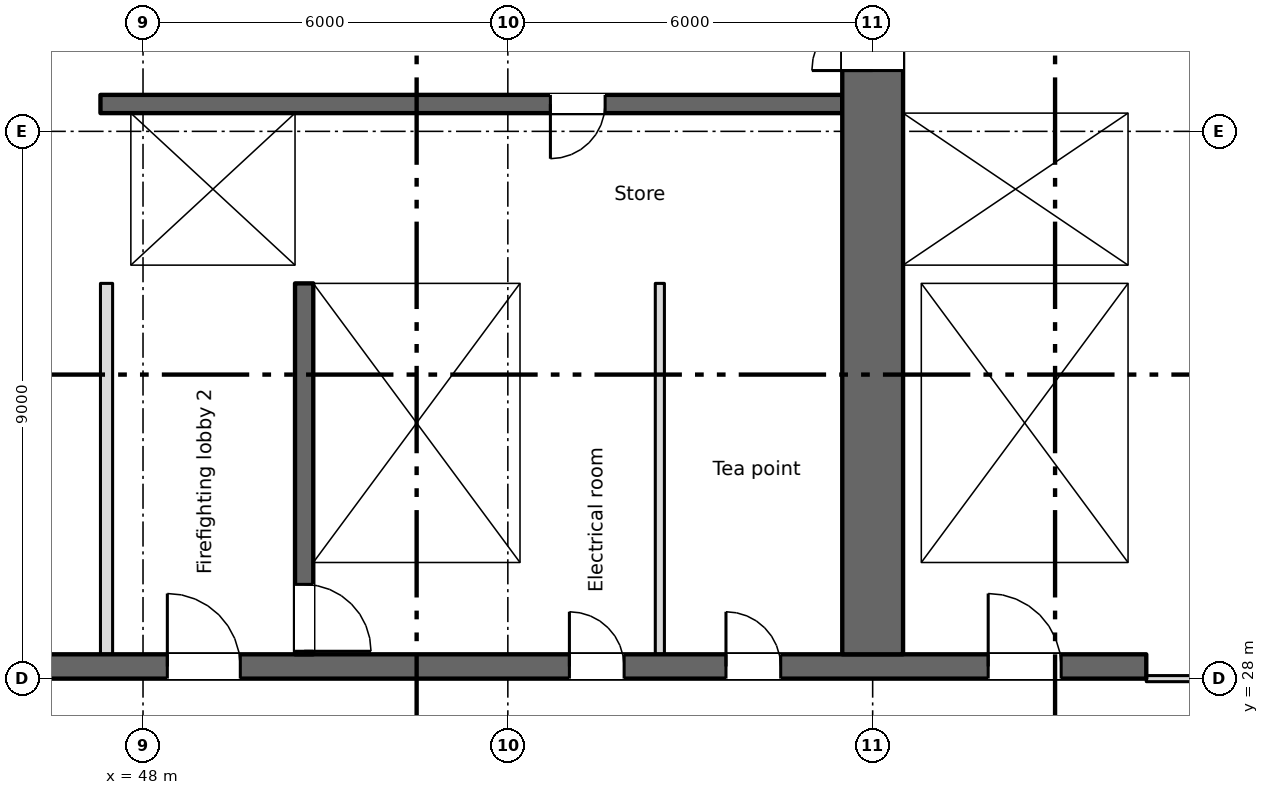
"""IFC4 building model, lengths in metres.
Left out: names, types, materials, properties, quantities, classifications, styles, units other than length and angle.
Written with IfcOpenShell. Run it as: python <this file> out.ifc"""

import sys

from ifc_helpers import new_model, si_unit, direction, frame, frame_2d, origin, place, context, subcontext, project, spatial, rectangle, extrude, element, fill, save


model = new_model("IFC4")
c1 = context("Model", 3, precision=1e-05, world=origin(), true_north=direction((0.0, 1.0)))
c2 = subcontext(c1, "Body", "Model", "MODEL_VIEW")
j1 = project(units=[si_unit("LENGTHUNIT", "METRE"), si_unit("PLANEANGLEUNIT", "RADIAN")], contexts=[c1])
p1 = place(None, origin())
s1 = spatial("IfcSite", under=j1, at=p1, CompositionType="ELEMENT")
p2 = place(p1, origin())
s2 = spatial("IfcBuilding", under=s1, at=p2, CompositionType="ELEMENT")
p3 = place(p2, frame((0.0, 0.0, 41.25)))
s3 = spatial("IfcBuildingStorey", under=s2, at=p3, CompositionType="ELEMENT", Elevation=41.25)
p4 = place(p3, frame((6.7, 28.2, 0.0), z_axis=(0.0, 0.0, 1.0), x_axis=(1.0, 0.0, 0.0)))
e1 = element("IfcWall", 1, at=p4, inside=s3, PredefinedType="SHEAR", context=c2, shape_type="SweptSolid", body=[
    extrude(rectangle(XDim=57.8, YDim=0.4, at=frame_2d((28.9, 0.0))), origin(), (0.0, 0.0, 1.0), 3.35),
])
p5 = place(p4, frame((12.812, 0.0, 0.0)))
e2 = element("IfcOpeningElement", 2, at=p5, cuts=e1, PredefinedType="OPENING", context=c2, shape_type="SweptSolid", body=[
    extrude(rectangle(XDim=0.9, YDim=2.1, at=frame_2d((0.45, 1.05))), frame((0.0, 0.21, 0.0), z_axis=(0.0, -1.0, 0.0), x_axis=(1.0, 0.0, 0.0)), (0.0, 0.0, 1.0), 0.42),
])
p6 = place(p4, frame((15.387, 0.0, 0.0)))
e3 = element("IfcOpeningElement", 3, at=p6, cuts=e1, PredefinedType="OPENING", context=c2, shape_type="SweptSolid", body=[
    extrude(rectangle(XDim=0.9, YDim=2.1, at=frame_2d((0.45, 1.05))), frame((0.0, 0.21, 0.0), z_axis=(0.0, -1.0, 0.0), x_axis=(1.0, 0.0, 0.0)), (0.0, 0.0, 1.0), 0.42),
])
p7 = place(p4, frame((48.312, 0.0, 0.0)))
e4 = element("IfcOpeningElement", 4, at=p7, cuts=e1, PredefinedType="OPENING", context=c2, shape_type="SweptSolid", body=[
    extrude(rectangle(XDim=0.9, YDim=2.1, at=frame_2d((0.45, 1.05))), frame((0.0, 0.21, 0.0), z_axis=(0.0, -1.0, 0.0), x_axis=(1.0, 0.0, 0.0)), (0.0, 0.0, 1.0), 0.42),
])
p8 = place(p4, frame((50.887, 0.0, 0.0)))
e5 = element("IfcOpeningElement", 5, at=p8, cuts=e1, PredefinedType="OPENING", context=c2, shape_type="SweptSolid", body=[
    extrude(rectangle(XDim=0.9, YDim=2.1, at=frame_2d((0.45, 1.05))), frame((0.0, 0.21, 0.0), z_axis=(0.0, -1.0, 0.0), x_axis=(1.0, 0.0, 0.0)), (0.0, 0.0, 1.0), 0.42),
])
p9 = place(p4, frame((0.562, 0.0, 0.0)))
e6 = element("IfcOpeningElement", 6, at=p9, cuts=e1, PredefinedType="OPENING", context=c2, shape_type="SweptSolid", body=[
    extrude(rectangle(XDim=0.9, YDim=2.1, at=frame_2d((0.45, 1.05))), frame((0.0, 0.21, 0.0), z_axis=(0.0, -1.0, 0.0), x_axis=(1.0, 0.0, 0.0)), (0.0, 0.0, 1.0), 0.42),
])
p10 = place(p4, frame((2.137, 0.0, 0.0)))
e7 = element("IfcOpeningElement", 7, at=p10, cuts=e1, PredefinedType="OPENING", context=c2, shape_type="SweptSolid", body=[
    extrude(rectangle(XDim=0.9, YDim=2.1, at=frame_2d((0.45, 1.05))), frame((0.0, 0.21, 0.0), z_axis=(0.0, -1.0, 0.0), x_axis=(1.0, 0.0, 0.0)), (0.0, 0.0, 1.0), 0.42),
])
p11 = place(p4, frame((4.7, 0.0, 0.0)))
e8 = element("IfcOpeningElement", 8, at=p11, cuts=e1, PredefinedType="OPENING", context=c2, shape_type="SweptSolid", body=[
    extrude(rectangle(XDim=1.2, YDim=2.1, at=frame_2d((0.6, 1.05))), frame((0.0, 0.21, 0.0), z_axis=(0.0, -1.0, 0.0), x_axis=(1.0, 0.0, 0.0)), (0.0, 0.0, 1.0), 0.42),
])
p12 = place(p4, frame((31.7, 0.0, 0.0)))
e9 = element("IfcOpeningElement", 9, at=p12, cuts=e1, PredefinedType="OPENING", context=c2, shape_type="SweptSolid", body=[
    extrude(rectangle(XDim=1.2, YDim=2.1, at=frame_2d((0.6, 1.05))), frame((0.0, 0.21, 0.0), z_axis=(0.0, -1.0, 0.0), x_axis=(1.0, 0.0, 0.0)), (0.0, 0.0, 1.0), 0.42),
])
p13 = place(p4, frame((55.2, 0.0, 0.0)))
e10 = element("IfcOpeningElement", 10, at=p13, cuts=e1, PredefinedType="OPENING", context=c2, shape_type="SweptSolid", body=[
    extrude(rectangle(XDim=1.2, YDim=2.1, at=frame_2d((0.6, 1.05))), frame((0.0, 0.21, 0.0), z_axis=(0.0, -1.0, 0.0), x_axis=(1.0, 0.0, 0.0)), (0.0, 0.0, 1.0), 0.42),
])
p14 = place(p4, frame((21.7, 0.0, 0.0)))
e11 = element("IfcOpeningElement", 11, at=p14, cuts=e1, PredefinedType="OPENING", context=c2, shape_type="SweptSolid", body=[
    extrude(rectangle(XDim=1.2, YDim=2.1, at=frame_2d((0.6, 1.05))), frame((0.0, 0.21, 0.0), z_axis=(0.0, -1.0, 0.0), x_axis=(1.0, 0.0, 0.0)), (0.0, 0.0, 1.0), 0.42),
])
p15 = place(p4, frame((41.7, 0.0, 0.0)))
e12 = element("IfcOpeningElement", 12, at=p15, cuts=e1, PredefinedType="OPENING", context=c2, shape_type="SweptSolid", body=[
    extrude(rectangle(XDim=1.2, YDim=2.1, at=frame_2d((0.6, 1.05))), frame((0.0, 0.21, 0.0), z_axis=(0.0, -1.0, 0.0), x_axis=(1.0, 0.0, 0.0)), (0.0, 0.0, 1.0), 0.42),
])
p16 = place(p4, frame((24.85, 0.0, 0.0)))
e13 = element("IfcOpeningElement", 13, at=p16, cuts=e1, PredefinedType="OPENING", context=c2, shape_type="SweptSolid", body=[
    extrude(rectangle(XDim=2.4, YDim=2.1, at=frame_2d((1.2, 1.05))), frame((0.0, 0.21, 0.0), z_axis=(0.0, -1.0, 0.0), x_axis=(1.0, 0.0, 0.0)), (0.0, 0.0, 1.0), 0.42),
])
p17 = place(p4, frame((37.35, 0.0, 0.0)))
e14 = element("IfcOpeningElement", 14, at=p17, cuts=e1, PredefinedType="OPENING", context=c2, shape_type="SweptSolid", body=[
    extrude(rectangle(XDim=2.4, YDim=2.1, at=frame_2d((1.2, 1.05))), frame((0.0, 0.21, 0.0), z_axis=(0.0, -1.0, 0.0), x_axis=(1.0, 0.0, 0.0)), (0.0, 0.0, 1.0), 0.42),
])
p18 = place(p4, frame((7.85, 0.0, 0.0)))
e15 = element("IfcOpeningElement", 15, at=p18, cuts=e1, PredefinedType="OPENING", context=c2, shape_type="SweptSolid", body=[
    extrude(rectangle(XDim=2.4, YDim=2.1, at=frame_2d((1.2, 1.05))), frame((0.0, 0.21, 0.0), z_axis=(0.0, -1.0, 0.0), x_axis=(1.0, 0.0, 0.0)), (0.0, 0.0, 1.0), 0.42),
])
p19 = place(p4, frame((28.85, 0.0, 0.0)))
e16 = element("IfcOpeningElement", 16, at=p19, cuts=e1, PredefinedType="OPENING", context=c2, shape_type="SweptSolid", body=[
    extrude(rectangle(XDim=0.9, YDim=2.1, at=frame_2d((0.45, 1.05))), frame((0.0, 0.21, 0.0), z_axis=(0.0, -1.0, 0.0), x_axis=(1.0, 0.0, 0.0)), (0.0, 0.0, 1.0), 0.42),
])
p20 = place(p4, frame((34.85, 0.0, 0.0)))
e17 = element("IfcOpeningElement", 17, at=p20, cuts=e1, PredefinedType="OPENING", context=c2, shape_type="SweptSolid", body=[
    extrude(rectangle(XDim=0.9, YDim=2.1, at=frame_2d((0.45, 1.05))), frame((0.0, 0.21, 0.0), z_axis=(0.0, -1.0, 0.0), x_axis=(1.0, 0.0, 0.0)), (0.0, 0.0, 1.0), 0.42),
])
p21 = place(p3, frame((64.35, 34.8, 0.0), z_axis=(0.0, 0.0, 1.0), x_axis=(0.0, 1.0, 0.0)))
e18 = element("IfcWall", 18, at=p21, inside=s3, PredefinedType="SHEAR", context=c2, shape_type="SweptSolid", body=[
    extrude(rectangle(XDim=10.2, YDim=0.3, at=frame_2d((5.1, 0.0))), origin(), (0.0, 0.0, 1.0), 3.35),
])
p22 = place(p3, frame((60.0, 28.4, 0.0), z_axis=(0.0, 0.0, 1.0), x_axis=(0.0, 1.0, 0.0)))
e19 = element("IfcWall", 19, at=p22, inside=s3, PredefinedType="SHEAR", context=c2, shape_type="SweptSolid", body=[
    extrude(rectangle(XDim=16.6, YDim=1.0, at=frame_2d((8.3, 0.0))), origin(), (0.0, 0.0, 1.0), 3.35),
])
p23 = place(p22, frame((9.6, 0.0, 0.0)))
e20 = element("IfcOpeningElement", 20, at=p23, cuts=e19, PredefinedType="OPENING", context=c2, shape_type="SweptSolid", body=[
    extrude(rectangle(XDim=2.0, YDim=2.1, at=frame_2d((1.0, 1.05))), frame((0.0, 0.51, 0.0), z_axis=(0.0, -1.0, 0.0), x_axis=(1.0, 0.0, 0.0)), (0.0, 0.0, 1.0), 1.02),
])
p24 = place(p22, frame((15.25, 0.0, 0.0)))
e21 = element("IfcOpeningElement", 21, at=p24, cuts=e19, PredefinedType="OPENING", context=c2, shape_type="SweptSolid", body=[
    extrude(rectangle(XDim=1.2, YDim=2.1, at=frame_2d((0.6, 1.05))), frame((0.0, 0.51, 0.0), z_axis=(0.0, -1.0, 0.0), x_axis=(1.0, 0.0, 0.0)), (0.0, 0.0, 1.0), 1.02),
])
p25 = place(p3, frame((50.65, 34.5, 0.0), z_axis=(0.0, 0.0, 1.0), x_axis=(0.0, -1.0, 0.0)))
e22 = element("IfcWall", 22, at=p25, inside=s3, PredefinedType="SHEAR", context=c2, shape_type="SweptSolid", body=[
    extrude(rectangle(XDim=6.1, YDim=0.3, at=frame_2d((3.05, 0.0))), origin(), (0.0, 0.0, 1.0), 3.35),
])
p26 = place(p25, frame((4.95, 0.0, 0.0)))
e23 = element("IfcOpeningElement", 23, at=p26, cuts=e22, PredefinedType="OPENING", context=c2, shape_type="SweptSolid", body=[
    extrude(rectangle(XDim=1.1, YDim=2.1, at=frame_2d((0.55, 1.05))), frame((0.0, 0.16, 0.0), z_axis=(0.0, -1.0, 0.0), x_axis=(1.0, 0.0, 0.0)), (0.0, 0.0, 1.0), 0.32),
])
for number, where, z_axis, x_axis in (
    (24, (54.35, 28.4, 0.0), (0.0, 0.0, 1.0), (0.0, 1.0, 0.0)),
    (25, (60.65, 28.4, 0.0), (0.0, 0.0, 1.0), (0.0, 1.0, 0.0)),
    (26, (64.35, 28.4, 0.0), (0.0, 0.0, 1.0), (0.0, 1.0, 0.0)),
):
    element("IfcWall", number, at=place(p3, frame(where, z_axis=z_axis, x_axis=x_axis)), inside=s3, PredefinedType="SHEAR", context=c2, shape_type="SweptSolid", body=[
        extrude(rectangle(XDim=6.1, YDim=0.3, at=frame_2d((3.05, 0.0))), origin(), (0.0, 0.0, 1.0), 3.35),
    ])
p27 = place(p3, frame((47.3, 34.65, 0.0), z_axis=(0.0, 0.0, 1.0), x_axis=(1.0, 0.0, 0.0)))
e27 = element("IfcWall", 27, at=p27, inside=s3, PredefinedType="SHEAR", context=c2, shape_type="SweptSolid", body=[
    extrude(rectangle(XDim=12.2, YDim=0.3, at=frame_2d((6.1, 0.0))), origin(), (0.0, 0.0, 1.0), 3.35),
])
p28 = place(p27, frame((1.3, 0.0, 0.0)))
e28 = element("IfcOpeningElement", 28, at=p28, cuts=e27, PredefinedType="OPENING", context=c2, shape_type="SweptSolid", body=[
    extrude(rectangle(XDim=1.1, YDim=2.1, at=frame_2d((0.55, 1.05))), frame((0.0, 0.16, 0.0), z_axis=(0.0, -1.0, 0.0), x_axis=(1.0, 0.0, 0.0)), (0.0, 0.0, 1.0), 0.32),
])
p29 = place(p3, frame((60.5, 34.65, 0.0), z_axis=(0.0, 0.0, 1.0), x_axis=(1.0, 0.0, 0.0)))
e29 = element("IfcWall", 29, at=p29, inside=s3, PredefinedType="SHEAR", context=c2, shape_type="SweptSolid", body=[
    extrude(rectangle(XDim=4.0, YDim=0.3, at=frame_2d((2.0, 0.0))), origin(), (0.0, 0.0, 1.0), 3.35),
])
p30 = place(p3, frame((59.5, 37.45, 0.0), z_axis=(0.0, 0.0, 1.0), x_axis=(-1.0, 0.0, 0.0)))
e30 = element("IfcWall", 30, at=p30, inside=s3, PredefinedType="SHEAR", context=c2, shape_type="SweptSolid", body=[
    extrude(rectangle(XDim=12.2, YDim=0.3, at=frame_2d((6.1, 0.0))), origin(), (0.0, 0.0, 1.0), 3.35),
])
p31 = place(p30, frame((3.9, 0.0, 0.0)))
e31 = element("IfcOpeningElement", 31, at=p31, cuts=e30, PredefinedType="OPENING", context=c2, shape_type="SweptSolid", body=[
    extrude(rectangle(XDim=0.9, YDim=2.1, at=frame_2d((0.45, 1.05))), frame((0.0, 0.16, 0.0), z_axis=(0.0, -1.0, 0.0), x_axis=(1.0, 0.0, 0.0)), (0.0, 0.0, 1.0), 0.32),
])
p32 = place(p3, frame((60.5, 37.45, 0.0), z_axis=(0.0, 0.0, 1.0), x_axis=(1.0, 0.0, 0.0)))
e32 = element("IfcWall", 32, at=p32, inside=s3, PredefinedType="SHEAR", context=c2, shape_type="SweptSolid", body=[
    extrude(rectangle(XDim=3.7, YDim=0.3, at=frame_2d((1.85, 0.0))), origin(), (0.0, 0.0, 1.0), 3.35),
])
p33 = place(p32, frame((1.3, 0.0, 0.0)))
e33 = element("IfcOpeningElement", 33, at=p33, cuts=e32, PredefinedType="OPENING", context=c2, shape_type="SweptSolid", body=[
    extrude(rectangle(XDim=1.1, YDim=2.1, at=frame_2d((0.55, 1.05))), frame((0.0, 0.16, 0.0), z_axis=(0.0, -1.0, 0.0), x_axis=(1.0, 0.0, 0.0)), (0.0, 0.0, 1.0), 0.32),
])
p34 = place(p3, frame((47.55, 34.8, 0.0), z_axis=(0.0, 0.0, 1.0), x_axis=(0.0, 1.0, 0.0)))
e34 = element("IfcWall", 34, at=p34, inside=s3, PredefinedType="SHEAR", context=c2, shape_type="SweptSolid", body=[
    extrude(rectangle(XDim=2.5, YDim=0.5, at=frame_2d((1.25, 0.0))), origin(), (0.0, 0.0, 1.0), 3.35),
])
p35 = place(p3, frame((50.65, 34.8, 0.0), z_axis=(0.0, 0.0, 1.0), x_axis=(0.0, 1.0, 0.0)))
e35 = element("IfcWall", 35, at=p35, inside=s3, PredefinedType="SHEAR", context=c2, shape_type="SweptSolid", body=[
    extrude(rectangle(XDim=2.5, YDim=0.3, at=frame_2d((1.25, 0.0))), origin(), (0.0, 0.0, 1.0), 3.35),
])
p36 = place(p3, frame((47.4, 28.4, 0.0), z_axis=(0.0, 0.0, 1.0), x_axis=(0.0, 1.0, 0.0)))
e36 = element("IfcWall", 36, at=p36, inside=s3, PredefinedType="PARTITIONING", context=c2, shape_type="SweptSolid", body=[
    extrude(rectangle(XDim=6.1, YDim=0.2, at=frame_2d((3.05, 0.0))), origin(), (0.0, 0.0, 1.0), 3.35),
])
p37 = place(p3, frame((56.5, 28.4, 0.0), z_axis=(0.0, 0.0, 1.0), x_axis=(0.0, 1.0, 0.0)))
e37 = element("IfcWall", 37, at=p37, inside=s3, PredefinedType="PARTITIONING", context=c2, shape_type="SweptSolid", body=[
    extrude(rectangle(XDim=6.1, YDim=0.15, at=frame_2d((3.05, 0.0))), origin(), (0.0, 0.0, 1.0), 3.35),
])
p38 = place(p3, frame((64.5, 28.0, 0.0), z_axis=(0.0, 0.0, 1.0), x_axis=(1.0, 0.0, 0.0)))
e38 = element("IfcWall", 38, at=p38, inside=s3, PredefinedType="PARTITIONING", context=c2, shape_type="SweptSolid", body=[
    extrude(rectangle(XDim=12.7, YDim=0.1, at=frame_2d((6.35, 0.0))), origin(), (0.0, 0.0, 1.0), 3.35),
])
p39 = place(p38, frame((8.975, 0.0, 0.0)))
e39 = element("IfcOpeningElement", 39, at=p39, cuts=e38, PredefinedType="OPENING", context=c2, shape_type="SweptSolid", body=[
    extrude(rectangle(XDim=1.8, YDim=2.1, at=frame_2d((0.9, 1.05))), frame((0.0, 0.06, 0.0), z_axis=(0.0, -1.0, 0.0), x_axis=(1.0, 0.0, 0.0)), (0.0, 0.0, 1.0), 0.12),
])
p40 = place(p38, frame((2.625, 0.0, 0.0)))
e40 = element("IfcOpeningElement", 40, at=p40, cuts=e38, PredefinedType="OPENING", context=c2, shape_type="SweptSolid", body=[
    extrude(rectangle(XDim=1.8, YDim=2.1, at=frame_2d((0.9, 1.05))), frame((0.0, 0.06, 0.0), z_axis=(0.0, -1.0, 0.0), x_axis=(1.0, 0.0, 0.0)), (0.0, 0.0, 1.0), 0.12),
])
p41 = place(p7, origin())
e41 = element("IfcDoor", 41, at=p41, inside=s3, OperationType="SINGLE_SWING_LEFT", PredefinedType="DOOR", context=c2, shape_type="SweptSolid", body=[
    extrude(rectangle(XDim=0.9, YDim=2.1, at=frame_2d((0.45, 1.05))), frame((0.0, 0.025, 0.0), z_axis=(0.0, -1.0, 0.0), x_axis=(1.0, 0.0, 0.0)), (0.0, 0.0, 1.0), 0.05),
])
fill(e4, e41)
p42 = place(p8, origin())
e42 = element("IfcDoor", 42, at=p42, inside=s3, OperationType="SINGLE_SWING_LEFT", PredefinedType="DOOR", context=c2, shape_type="SweptSolid", body=[
    extrude(rectangle(XDim=0.9, YDim=2.1, at=frame_2d((0.45, 1.05))), frame((0.0, 0.025, 0.0), z_axis=(0.0, -1.0, 0.0), x_axis=(1.0, 0.0, 0.0)), (0.0, 0.0, 1.0), 0.05),
])
fill(e5, e42)
p43 = place(p31, origin())
e43 = element("IfcDoor", 43, at=p43, inside=s3, OperationType="SINGLE_SWING_RIGHT", PredefinedType="DOOR", context=c2, shape_type="SweptSolid", body=[
    extrude(rectangle(XDim=0.9, YDim=2.1, at=frame_2d((0.45, 1.05))), frame((0.0, 0.025, 0.0), z_axis=(0.0, -1.0, 0.0), x_axis=(1.0, 0.0, 0.0)), (0.0, 0.0, 1.0), 0.05),
])
fill(e31, e43)
p44 = place(p33, origin())
e44 = element("IfcDoor", 44, at=p44, inside=s3, OperationType="SLIDING_TO_LEFT", PredefinedType="DOOR", context=c2, shape_type="SweptSolid", body=[
    extrude(rectangle(XDim=1.1, YDim=2.1, at=frame_2d((0.55, 1.05))), frame((0.0, 0.025, 0.0), z_axis=(0.0, -1.0, 0.0), x_axis=(1.0, 0.0, 0.0)), (0.0, 0.0, 1.0), 0.05),
])
fill(e33, e44)
p45 = place(p28, origin())
e45 = element("IfcDoor", 45, at=p45, inside=s3, OperationType="SLIDING_TO_LEFT", PredefinedType="DOOR", context=c2, shape_type="SweptSolid", body=[
    extrude(rectangle(XDim=1.1, YDim=2.1, at=frame_2d((0.55, 1.05))), frame((0.0, 0.025, 0.0), z_axis=(0.0, -1.0, 0.0), x_axis=(1.0, 0.0, 0.0)), (0.0, 0.0, 1.0), 0.05),
])
fill(e28, e45)
p46 = place(p26, origin())
e46 = element("IfcDoor", 46, at=p46, inside=s3, OperationType="SINGLE_SWING_RIGHT", PredefinedType="DOOR", context=c2, shape_type="SweptSolid", body=[
    extrude(rectangle(XDim=1.1, YDim=2.1, at=frame_2d((0.55, 1.05))), frame((0.0, 0.025, 0.0), z_axis=(0.0, -1.0, 0.0), x_axis=(1.0, 0.0, 0.0)), (0.0, 0.0, 1.0), 0.05),
])
fill(e23, e46)
p47 = place(p13, origin())
e47 = element("IfcDoor", 47, at=p47, inside=s3, OperationType="SINGLE_SWING_LEFT", PredefinedType="DOOR", context=c2, shape_type="SweptSolid", body=[
    extrude(rectangle(XDim=1.2, YDim=2.1, at=frame_2d((0.6, 1.05))), frame((0.0, 0.025, 0.0), z_axis=(0.0, -1.0, 0.0), x_axis=(1.0, 0.0, 0.0)), (0.0, 0.0, 1.0), 0.05),
])
fill(e10, e47)
p48 = place(p15, origin())
e48 = element("IfcDoor", 48, at=p48, inside=s3, OperationType="SINGLE_SWING_LEFT", PredefinedType="DOOR", context=c2, shape_type="SweptSolid", body=[
    extrude(rectangle(XDim=1.2, YDim=2.1, at=frame_2d((0.6, 1.05))), frame((0.0, 0.025, 0.0), z_axis=(0.0, -1.0, 0.0), x_axis=(1.0, 0.0, 0.0)), (0.0, 0.0, 1.0), 0.05),
])
fill(e12, e48)
p49 = place(p23, origin())
e49 = element("IfcDoor", 49, at=p49, inside=s3, OperationType="DOUBLE_DOOR_SINGLE_SWING", PredefinedType="DOOR", context=c2, shape_type="SweptSolid", body=[
    extrude(rectangle(XDim=2.0, YDim=2.1, at=frame_2d((1.0, 1.05))), frame((0.0, 0.025, 0.0), z_axis=(0.0, -1.0, 0.0), x_axis=(1.0, 0.0, 0.0)), (0.0, 0.0, 1.0), 0.05),
])
fill(e20, e49)
save(model, sys.argv[1])
